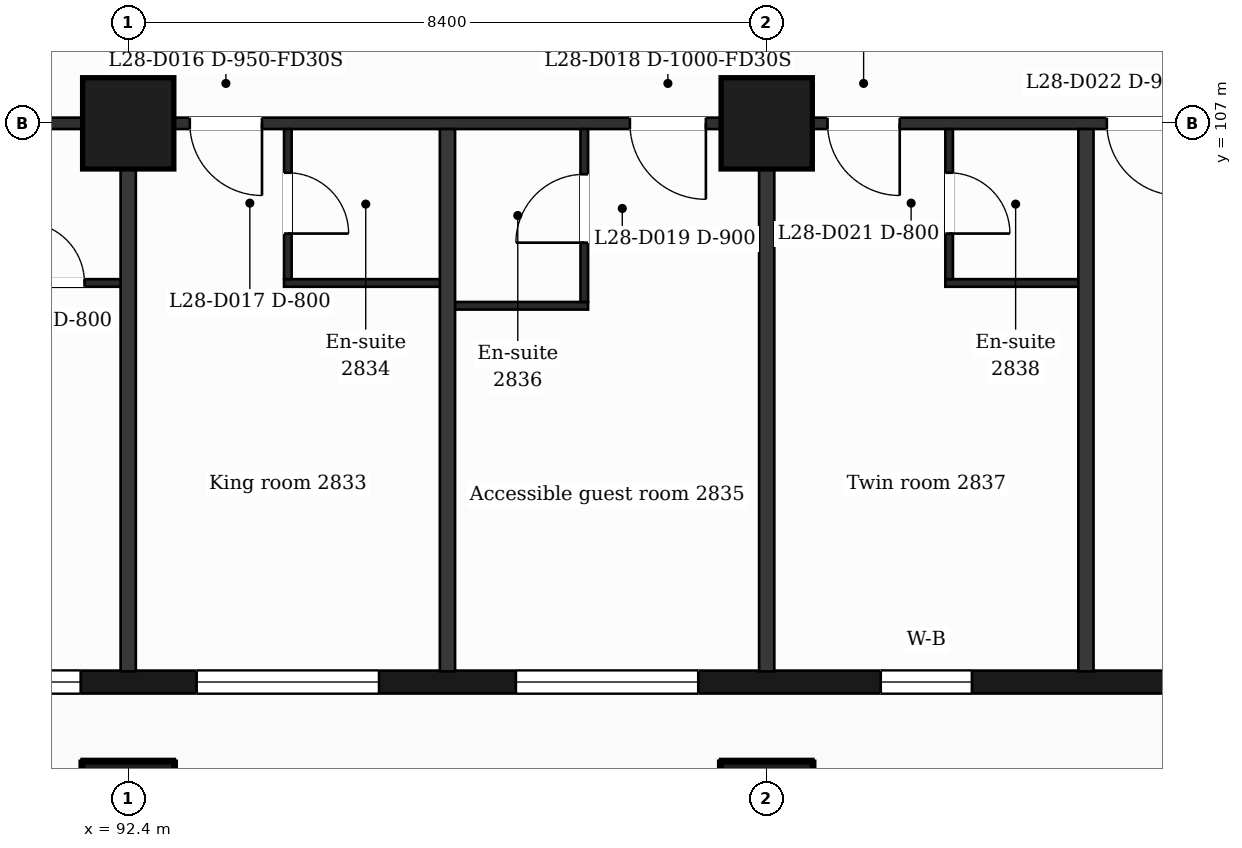
"""IFC4 building model, lengths in metres.
Left out: names, types, materials, properties, quantities, classifications, styles, units other than length and angle.
Written with IfcOpenShell. Run it as: python <this file> out.ifc"""

import sys

from ifc_helpers import new_model, si_unit, direction, frame, frame_2d, origin, origin_2d, place, context, subcontext, project, spatial, rectangle, extrude, element, fill, save


model = new_model("IFC4")
c1 = context("Model", 3, precision=1e-05, world=origin(), true_north=direction((0.0, 1.0)))
c2 = subcontext(c1, "Body", "Model", "MODEL_VIEW")
j1 = project(units=[si_unit("LENGTHUNIT", "METRE"), si_unit("PLANEANGLEUNIT", "RADIAN")], contexts=[c1])
p1 = place(None, origin())
s1 = spatial("IfcSite", under=j1, at=p1, CompositionType="ELEMENT")
p2 = place(p1, origin())
s2 = spatial("IfcBuilding", under=s1, at=p2, CompositionType="ELEMENT")
p3 = place(p2, frame((0.0, 0.0, 120.6)))
s3 = spatial("IfcBuildingStorey", under=s2, at=p3, CompositionType="ELEMENT", Elevation=120.6)
for number, where, z_axis, x_axis in (
    (1, (92.4, 98.0, 0.0), (0.0, 0.0, 1.0), (1.0, 0.0, 0.0)),
    (2, (100.8, 98.0, 0.0), (0.0, 0.0, 1.0), (1.0, 0.0, 0.0)),
    (3, (92.4, 107.0, 0.0), (0.0, 0.0, 1.0), (1.0, 0.0, 0.0)),
    (4, (100.8, 107.0, 0.0), (0.0, 0.0, 1.0), (1.0, 0.0, 0.0)),
):
    element("IfcColumn", number, at=place(p3, frame(where, z_axis=z_axis, x_axis=x_axis)), inside=s3, PredefinedType="COLUMN", context=c2, shape_type="SweptSolid", body=[
        extrude(rectangle(XDim=1.2, YDim=1.2, at=origin_2d()), origin(), (0.0, 0.0, 1.0), 3.7),
    ])
p4 = place(p3, frame((89.85, 99.65, 0.0), z_axis=(0.0, 0.0, 1.0), x_axis=(1.0, 0.0, 0.0)))
e5 = element("IfcWall", 5, at=p4, inside=s3, PredefinedType="SOLIDWALL", context=c2, shape_type="SweptSolid", body=[
    extrude(rectangle(XDim=47.25, YDim=0.3, at=frame_2d((23.625, 0.0))), origin(), (0.0, 0.0, 1.0), 3.38),
])
p5 = place(p4, frame((0.725, 0.0, 0.9)))
e6 = element("IfcOpeningElement", 6, at=p5, cuts=e5, PredefinedType="OPENING", context=c2, shape_type="SweptSolid", body=[
    extrude(rectangle(XDim=1.2, YDim=2.1, at=frame_2d((0.6, 1.05))), frame((0.0, 0.16, 0.0), z_axis=(0.0, -1.0, 0.0), x_axis=(1.0, 0.0, 0.0)), (0.0, 0.0, 1.0), 0.32),
])
p6 = place(p4, frame((3.45, 0.0, 0.9)))
e7 = element("IfcOpeningElement", 7, at=p6, cuts=e5, PredefinedType="OPENING", context=c2, shape_type="SweptSolid", body=[
    extrude(rectangle(XDim=2.4, YDim=2.1, at=frame_2d((1.2, 1.05))), frame((0.0, 0.16, 0.0), z_axis=(0.0, -1.0, 0.0), x_axis=(1.0, 0.0, 0.0)), (0.0, 0.0, 1.0), 0.32),
])
p7 = place(p4, frame((7.65, 0.0, 0.9)))
e8 = element("IfcOpeningElement", 8, at=p7, cuts=e5, PredefinedType="OPENING", context=c2, shape_type="SweptSolid", body=[
    extrude(rectangle(XDim=2.4, YDim=2.1, at=frame_2d((1.2, 1.05))), frame((0.0, 0.16, 0.0), z_axis=(0.0, -1.0, 0.0), x_axis=(1.0, 0.0, 0.0)), (0.0, 0.0, 1.0), 0.32),
])
p8 = place(p4, frame((12.45, 0.0, 0.9)))
e9 = element("IfcOpeningElement", 9, at=p8, cuts=e5, PredefinedType="OPENING", context=c2, shape_type="SweptSolid", body=[
    extrude(rectangle(XDim=1.2, YDim=2.1, at=frame_2d((0.6, 1.05))), frame((0.0, 0.16, 0.0), z_axis=(0.0, -1.0, 0.0), x_axis=(1.0, 0.0, 0.0)), (0.0, 0.0, 1.0), 0.32),
])
p9 = place(p4, frame((16.65, 0.0, 0.9)))
e10 = element("IfcOpeningElement", 10, at=p9, cuts=e5, PredefinedType="OPENING", context=c2, shape_type="SweptSolid", body=[
    extrude(rectangle(XDim=1.2, YDim=2.1, at=frame_2d((0.6, 1.05))), frame((0.0, 0.16, 0.0), z_axis=(0.0, -1.0, 0.0), x_axis=(1.0, 0.0, 0.0)), (0.0, 0.0, 1.0), 0.32),
])
p10 = place(p4, frame((19.95, 0.0, 0.0)))
e11 = element("IfcOpeningElement", 11, at=p10, cuts=e5, PredefinedType="OPENING", context=c2, shape_type="SweptSolid", body=[
    extrude(rectangle(XDim=1.2, YDim=2.4, at=frame_2d((0.6, 1.2))), frame((0.0, 0.16, 0.0), z_axis=(0.0, -1.0, 0.0), x_axis=(1.0, 0.0, 0.0)), (0.0, 0.0, 1.0), 0.32),
])
p11 = place(p4, frame((21.75, 0.0, 0.9)))
e12 = element("IfcOpeningElement", 12, at=p11, cuts=e5, PredefinedType="OPENING", context=c2, shape_type="SweptSolid", body=[
    extrude(rectangle(XDim=1.2, YDim=2.1, at=frame_2d((0.6, 1.05))), frame((0.0, 0.16, 0.0), z_axis=(0.0, -1.0, 0.0), x_axis=(1.0, 0.0, 0.0)), (0.0, 0.0, 1.0), 0.32),
])
p12 = place(p4, frame((24.45, 0.0, 0.9)))
e13 = element("IfcOpeningElement", 13, at=p12, cuts=e5, PredefinedType="OPENING", context=c2, shape_type="SweptSolid", body=[
    extrude(rectangle(XDim=2.4, YDim=2.1, at=frame_2d((1.2, 1.05))), frame((0.0, 0.16, 0.0), z_axis=(0.0, -1.0, 0.0), x_axis=(1.0, 0.0, 0.0)), (0.0, 0.0, 1.0), 0.32),
])
p13 = place(p4, frame((28.35, 0.0, 0.0)))
e14 = element("IfcOpeningElement", 14, at=p13, cuts=e5, PredefinedType="OPENING", context=c2, shape_type="SweptSolid", body=[
    extrude(rectangle(XDim=1.2, YDim=2.4, at=frame_2d((0.6, 1.2))), frame((0.0, 0.16, 0.0), z_axis=(0.0, -1.0, 0.0), x_axis=(1.0, 0.0, 0.0)), (0.0, 0.0, 1.0), 0.32),
])
p14 = place(p4, frame((30.15, 0.0, 0.9)))
e15 = element("IfcOpeningElement", 15, at=p14, cuts=e5, PredefinedType="OPENING", context=c2, shape_type="SweptSolid", body=[
    extrude(rectangle(XDim=1.2, YDim=2.1, at=frame_2d((0.6, 1.05))), frame((0.0, 0.16, 0.0), z_axis=(0.0, -1.0, 0.0), x_axis=(1.0, 0.0, 0.0)), (0.0, 0.0, 1.0), 0.32),
])
p15 = place(p4, frame((32.85, 0.0, 0.9)))
e16 = element("IfcOpeningElement", 16, at=p15, cuts=e5, PredefinedType="OPENING", context=c2, shape_type="SweptSolid", body=[
    extrude(rectangle(XDim=2.4, YDim=2.1, at=frame_2d((1.2, 1.05))), frame((0.0, 0.16, 0.0), z_axis=(0.0, -1.0, 0.0), x_axis=(1.0, 0.0, 0.0)), (0.0, 0.0, 1.0), 0.32),
])
p16 = place(p4, frame((37.05, 0.0, 0.9)))
e17 = element("IfcOpeningElement", 17, at=p16, cuts=e5, PredefinedType="OPENING", context=c2, shape_type="SweptSolid", body=[
    extrude(rectangle(XDim=2.4, YDim=2.1, at=frame_2d((1.2, 1.05))), frame((0.0, 0.16, 0.0), z_axis=(0.0, -1.0, 0.0), x_axis=(1.0, 0.0, 0.0)), (0.0, 0.0, 1.0), 0.32),
])
p17 = place(p4, frame((41.85, 0.0, 0.9)))
e18 = element("IfcOpeningElement", 18, at=p17, cuts=e5, PredefinedType="OPENING", context=c2, shape_type="SweptSolid", body=[
    extrude(rectangle(XDim=1.2, YDim=2.1, at=frame_2d((0.6, 1.05))), frame((0.0, 0.16, 0.0), z_axis=(0.0, -1.0, 0.0), x_axis=(1.0, 0.0, 0.0)), (0.0, 0.0, 1.0), 0.32),
])
p18 = place(p4, frame((45.25, 0.0, 0.9)))
e19 = element("IfcOpeningElement", 19, at=p18, cuts=e5, PredefinedType="OPENING", context=c2, shape_type="SweptSolid", body=[
    extrude(rectangle(XDim=1.2, YDim=2.1, at=frame_2d((0.6, 1.05))), frame((0.0, 0.16, 0.0), z_axis=(0.0, -1.0, 0.0), x_axis=(1.0, 0.0, 0.0)), (0.0, 0.0, 1.0), 0.32),
])
p19 = place(p3, frame((96.6, 104.6, 0.0), z_axis=(0.0, 0.0, 1.0), x_axis=(1.0, 0.0, 0.0)))
e20 = element("IfcWall", 20, at=p19, inside=s3, PredefinedType="PARTITIONING", context=c2, shape_type="SweptSolid", body=[
    extrude(rectangle(XDim=1.85, YDim=0.1, at=frame_2d((0.925, 0.0))), origin(), (0.0, 0.0, 1.0), 3.38),
])
p20 = place(p3, frame((89.95, 104.9, 0.0), z_axis=(0.0, 0.0, 1.0), x_axis=(1.0, 0.0, 0.0)))
e21 = element("IfcWall", 21, at=p20, inside=s3, PredefinedType="PARTITIONING", context=c2, shape_type="SweptSolid", body=[
    extrude(rectangle(XDim=2.45, YDim=0.1, at=frame_2d((1.225, 0.0))), origin(), (0.0, 0.0, 1.0), 3.38),
])
p21 = place(p20, frame((1.075, 0.0, 0.0)))
e22 = element("IfcOpeningElement", 22, at=p21, cuts=e21, PredefinedType="OPENING", context=c2, shape_type="SweptSolid", body=[
    extrude(rectangle(XDim=0.8, YDim=2.1, at=frame_2d((0.4, 1.05))), frame((0.0, 0.06, 0.0), z_axis=(0.0, -1.0, 0.0), x_axis=(1.0, 0.0, 0.0)), (0.0, 0.0, 1.0), 0.12),
])
p22 = place(p3, frame((94.45, 104.9, 0.0), z_axis=(0.0, 0.0, 1.0), x_axis=(1.0, 0.0, 0.0)))
e23 = element("IfcWall", 23, at=p22, inside=s3, PredefinedType="PARTITIONING", context=c2, shape_type="SweptSolid", body=[
    extrude(rectangle(XDim=2.15, YDim=0.1, at=frame_2d((1.075, 0.0))), origin(), (0.0, 0.0, 1.0), 3.38),
])
p23 = place(p3, frame((103.15, 104.9, 0.0), z_axis=(0.0, 0.0, 1.0), x_axis=(1.0, 0.0, 0.0)))
e24 = element("IfcWall", 24, at=p23, inside=s3, PredefinedType="PARTITIONING", context=c2, shape_type="SweptSolid", body=[
    extrude(rectangle(XDim=1.85, YDim=0.1, at=frame_2d((0.925, 0.0))), origin(), (0.0, 0.0, 1.0), 3.38),
])
p24 = place(p3, frame((87.018, 107.0, 0.0), z_axis=(0.0, 0.0, 1.0), x_axis=(1.0, 0.0, 0.0)))
e25 = element("IfcWall", 25, at=p24, inside=s3, PredefinedType="PARTITIONING", context=c2, shape_type="SweptSolid", body=[
    extrude(rectangle(XDim=52.765, YDim=0.15, at=frame_2d((26.382, 0.0))), origin(), (0.0, 0.0, 1.0), 3.38),
])
p25 = place(p24, frame((1.276, 0.0, 0.0)))
e26 = element("IfcOpeningElement", 26, at=p25, cuts=e25, PredefinedType="OPENING", context=c2, shape_type="SweptSolid", body=[
    extrude(rectangle(XDim=0.95, YDim=2.1, at=frame_2d((0.475, 1.05))), frame((0.0, 0.085, 0.0), z_axis=(0.0, -1.0, 0.0), x_axis=(1.0, 0.0, 0.0)), (0.0, 0.0, 1.0), 0.17),
])
p26 = place(p24, frame((6.192, 0.0, 0.0)))
e27 = element("IfcOpeningElement", 27, at=p26, cuts=e25, PredefinedType="OPENING", context=c2, shape_type="SweptSolid", body=[
    extrude(rectangle(XDim=0.95, YDim=2.1, at=frame_2d((0.475, 1.05))), frame((0.0, 0.085, 0.0), z_axis=(0.0, -1.0, 0.0), x_axis=(1.0, 0.0, 0.0)), (0.0, 0.0, 1.0), 0.17),
])
p27 = place(p24, frame((11.982, 0.0, 0.0)))
e28 = element("IfcOpeningElement", 28, at=p27, cuts=e25, PredefinedType="OPENING", context=c2, shape_type="SweptSolid", body=[
    extrude(rectangle(XDim=1.0, YDim=2.1, at=frame_2d((0.5, 1.05))), frame((0.0, 0.085, 0.0), z_axis=(0.0, -1.0, 0.0), x_axis=(1.0, 0.0, 0.0)), (0.0, 0.0, 1.0), 0.17),
])
p28 = place(p24, frame((14.582, 0.0, 0.0)))
e29 = element("IfcOpeningElement", 29, at=p28, cuts=e25, PredefinedType="OPENING", context=c2, shape_type="SweptSolid", body=[
    extrude(rectangle(XDim=0.95, YDim=2.1, at=frame_2d((0.475, 1.05))), frame((0.0, 0.085, 0.0), z_axis=(0.0, -1.0, 0.0), x_axis=(1.0, 0.0, 0.0)), (0.0, 0.0, 1.0), 0.17),
])
p29 = place(p24, frame((18.257, 0.0, 0.0)))
e30 = element("IfcOpeningElement", 30, at=p29, cuts=e25, PredefinedType="OPENING", context=c2, shape_type="SweptSolid", body=[
    extrude(rectangle(XDim=0.95, YDim=2.1, at=frame_2d((0.475, 1.05))), frame((0.0, 0.085, 0.0), z_axis=(0.0, -1.0, 0.0), x_axis=(1.0, 0.0, 0.0)), (0.0, 0.0, 1.0), 0.17),
])
p30 = place(p24, frame((22.992, 0.0, 0.0)))
e31 = element("IfcOpeningElement", 31, at=p30, cuts=e25, PredefinedType="OPENING", context=c2, shape_type="SweptSolid", body=[
    extrude(rectangle(XDim=0.95, YDim=2.1, at=frame_2d((0.475, 1.05))), frame((0.0, 0.085, 0.0), z_axis=(0.0, -1.0, 0.0), x_axis=(1.0, 0.0, 0.0)), (0.0, 0.0, 1.0), 0.17),
])
p31 = place(p24, frame((26.632, 0.0, 0.0)))
e32 = element("IfcOpeningElement", 32, at=p31, cuts=e25, PredefinedType="OPENING", context=c2, shape_type="SweptSolid", body=[
    extrude(rectangle(XDim=1.0, YDim=2.1, at=frame_2d((0.5, 1.05))), frame((0.0, 0.085, 0.0), z_axis=(0.0, -1.0, 0.0), x_axis=(1.0, 0.0, 0.0)), (0.0, 0.0, 1.0), 0.17),
])
p32 = place(p24, frame((33.557, 0.0, 0.0)))
e33 = element("IfcOpeningElement", 33, at=p32, cuts=e25, PredefinedType="OPENING", context=c2, shape_type="SweptSolid", body=[
    extrude(rectangle(XDim=0.95, YDim=2.1, at=frame_2d((0.475, 1.05))), frame((0.0, 0.085, 0.0), z_axis=(0.0, -1.0, 0.0), x_axis=(1.0, 0.0, 0.0)), (0.0, 0.0, 1.0), 0.17),
])
p33 = place(p24, frame((37.182, 0.0, 0.0)))
e34 = element("IfcOpeningElement", 34, at=p33, cuts=e25, PredefinedType="OPENING", context=c2, shape_type="SweptSolid", body=[
    extrude(rectangle(XDim=0.95, YDim=2.1, at=frame_2d((0.475, 1.05))), frame((0.0, 0.085, 0.0), z_axis=(0.0, -1.0, 0.0), x_axis=(1.0, 0.0, 0.0)), (0.0, 0.0, 1.0), 0.17),
])
p34 = place(p24, frame((41.957, 0.0, 0.0)))
e35 = element("IfcOpeningElement", 35, at=p34, cuts=e25, PredefinedType="OPENING", context=c2, shape_type="SweptSolid", body=[
    extrude(rectangle(XDim=0.95, YDim=2.1, at=frame_2d((0.475, 1.05))), frame((0.0, 0.085, 0.0), z_axis=(0.0, -1.0, 0.0), x_axis=(1.0, 0.0, 0.0)), (0.0, 0.0, 1.0), 0.17),
])
p35 = place(p24, frame((45.622, 0.0, 0.0)))
e36 = element("IfcOpeningElement", 36, at=p35, cuts=e25, PredefinedType="OPENING", context=c2, shape_type="SweptSolid", body=[
    extrude(rectangle(XDim=0.95, YDim=2.1, at=frame_2d((0.475, 1.05))), frame((0.0, 0.085, 0.0), z_axis=(0.0, -1.0, 0.0), x_axis=(1.0, 0.0, 0.0)), (0.0, 0.0, 1.0), 0.17),
])
p36 = place(p24, frame((48.56, 0.0, 0.0)))
e37 = element("IfcOpeningElement", 37, at=p36, cuts=e25, PredefinedType="OPENING", context=c2, shape_type="SweptSolid", body=[
    extrude(rectangle(XDim=0.95, YDim=2.1, at=frame_2d((0.475, 1.05))), frame((0.0, 0.085, 0.0), z_axis=(0.0, -1.0, 0.0), x_axis=(1.0, 0.0, 0.0)), (0.0, 0.0, 1.0), 0.17),
])
p37 = place(p3, frame((92.4, 99.79, 0.0), z_axis=(0.0, 0.0, 1.0), x_axis=(0.0, 1.0, 0.0)))
e38 = element("IfcWall", 38, at=p37, inside=s3, PredefinedType="PARTITIONING", context=c2, shape_type="SweptSolid", body=[
    extrude(rectangle(XDim=7.135, YDim=0.2, at=frame_2d((3.567, 0.0))), origin(), (0.0, 0.0, 1.0), 3.38),
])
p38 = place(p3, frame((94.5, 104.95, 0.0), z_axis=(0.0, 0.0, 1.0), x_axis=(0.0, 1.0, 0.0)))
e39 = element("IfcWall", 39, at=p38, inside=s3, PredefinedType="PARTITIONING", context=c2, shape_type="SweptSolid", body=[
    extrude(rectangle(XDim=1.975, YDim=0.1, at=frame_2d((0.988, 0.0))), origin(), (0.0, 0.0, 1.0), 3.38),
])
p39 = place(p38, frame((0.6, 0.0, 0.0)))
e40 = element("IfcOpeningElement", 40, at=p39, cuts=e39, PredefinedType="OPENING", context=c2, shape_type="SweptSolid", body=[
    extrude(rectangle(XDim=0.8, YDim=2.1, at=frame_2d((0.4, 1.05))), frame((0.0, 0.06, 0.0), z_axis=(0.0, -1.0, 0.0), x_axis=(1.0, 0.0, 0.0)), (0.0, 0.0, 1.0), 0.12),
])
p40 = place(p3, frame((96.6, 99.79, 0.0), z_axis=(0.0, 0.0, 1.0), x_axis=(0.0, 1.0, 0.0)))
e41 = element("IfcWall", 41, at=p40, inside=s3, PredefinedType="PARTITIONING", context=c2, shape_type="SweptSolid", body=[
    extrude(rectangle(XDim=7.135, YDim=0.2, at=frame_2d((3.567, 0.0))), origin(), (0.0, 0.0, 1.0), 3.38),
])
p41 = place(p3, frame((98.4, 104.65, 0.0), z_axis=(0.0, 0.0, 1.0), x_axis=(0.0, 1.0, 0.0)))
e42 = element("IfcWall", 42, at=p41, inside=s3, PredefinedType="PARTITIONING", context=c2, shape_type="SweptSolid", body=[
    extrude(rectangle(XDim=2.275, YDim=0.1, at=frame_2d((1.138, 0.0))), origin(), (0.0, 0.0, 1.0), 3.38),
])
p42 = place(p41, frame((0.78, 0.0, 0.0)))
e43 = element("IfcOpeningElement", 43, at=p42, cuts=e42, PredefinedType="OPENING", context=c2, shape_type="SweptSolid", body=[
    extrude(rectangle(XDim=0.9, YDim=2.1, at=frame_2d((0.45, 1.05))), frame((0.0, 0.06, 0.0), z_axis=(0.0, -1.0, 0.0), x_axis=(1.0, 0.0, 0.0)), (0.0, 0.0, 1.0), 0.12),
])
p43 = place(p3, frame((100.8, 99.79, 0.0), z_axis=(0.0, 0.0, 1.0), x_axis=(0.0, 1.0, 0.0)))
e44 = element("IfcWall", 44, at=p43, inside=s3, PredefinedType="PARTITIONING", context=c2, shape_type="SweptSolid", body=[
    extrude(rectangle(XDim=7.135, YDim=0.2, at=frame_2d((3.567, 0.0))), origin(), (0.0, 0.0, 1.0), 3.38),
])
p44 = place(p3, frame((103.2, 104.95, 0.0), z_axis=(0.0, 0.0, 1.0), x_axis=(0.0, 1.0, 0.0)))
e45 = element("IfcWall", 45, at=p44, inside=s3, PredefinedType="PARTITIONING", context=c2, shape_type="SweptSolid", body=[
    extrude(rectangle(XDim=1.975, YDim=0.1, at=frame_2d((0.988, 0.0))), origin(), (0.0, 0.0, 1.0), 3.38),
])
p45 = place(p44, frame((0.6, 0.0, 0.0)))
e46 = element("IfcOpeningElement", 46, at=p45, cuts=e45, PredefinedType="OPENING", context=c2, shape_type="SweptSolid", body=[
    extrude(rectangle(XDim=0.8, YDim=2.1, at=frame_2d((0.4, 1.05))), frame((0.0, 0.06, 0.0), z_axis=(0.0, -1.0, 0.0), x_axis=(1.0, 0.0, 0.0)), (0.0, 0.0, 1.0), 0.12),
])
p46 = place(p3, frame((105.0, 99.79, 0.0), z_axis=(0.0, 0.0, 1.0), x_axis=(0.0, 1.0, 0.0)))
e47 = element("IfcWall", 47, at=p46, inside=s3, PredefinedType="PARTITIONING", context=c2, shape_type="SweptSolid", body=[
    extrude(rectangle(XDim=7.135, YDim=0.2, at=frame_2d((3.567, 0.0))), origin(), (0.0, 0.0, 1.0), 3.38),
])
p47 = place(p5, origin())
e48 = element("IfcWindow", 48, at=p47, inside=s3, PartitioningType="SINGLE_PANEL", PredefinedType="WINDOW", context=c2, shape_type="SweptSolid", body=[
    extrude(rectangle(XDim=1.2, YDim=2.1, at=frame_2d((0.6, 1.05))), frame((0.0, 0.03, 0.0), z_axis=(0.0, -1.0, 0.0), x_axis=(1.0, 0.0, 0.0)), (0.0, 0.0, 1.0), 0.06),
])
fill(e6, e48)
p48 = place(p6, origin())
e49 = element("IfcWindow", 49, at=p48, inside=s3, PartitioningType="SINGLE_PANEL", PredefinedType="WINDOW", context=c2, shape_type="SweptSolid", body=[
    extrude(rectangle(XDim=2.4, YDim=2.1, at=frame_2d((1.2, 1.05))), frame((0.0, 0.03, 0.0), z_axis=(0.0, -1.0, 0.0), x_axis=(1.0, 0.0, 0.0)), (0.0, 0.0, 1.0), 0.06),
])
fill(e7, e49)
p49 = place(p7, origin())
e50 = element("IfcWindow", 50, at=p49, inside=s3, PartitioningType="SINGLE_PANEL", PredefinedType="WINDOW", context=c2, shape_type="SweptSolid", body=[
    extrude(rectangle(XDim=2.4, YDim=2.1, at=frame_2d((1.2, 1.05))), frame((0.0, 0.03, 0.0), z_axis=(0.0, -1.0, 0.0), x_axis=(1.0, 0.0, 0.0)), (0.0, 0.0, 1.0), 0.06),
])
fill(e8, e50)
p50 = place(p8, origin())
e51 = element("IfcWindow", 51, at=p50, inside=s3, PartitioningType="SINGLE_PANEL", PredefinedType="WINDOW", context=c2, shape_type="SweptSolid", body=[
    extrude(rectangle(XDim=1.2, YDim=2.1, at=frame_2d((0.6, 1.05))), frame((0.0, 0.03, 0.0), z_axis=(0.0, -1.0, 0.0), x_axis=(1.0, 0.0, 0.0)), (0.0, 0.0, 1.0), 0.06),
])
fill(e9, e51)
p51 = place(p21, origin())
e52 = element("IfcDoor", 52, at=p51, inside=s3, OperationType="SINGLE_SWING_LEFT", PredefinedType="DOOR", context=c2, shape_type="SweptSolid", body=[
    extrude(rectangle(XDim=0.8, YDim=2.1, at=frame_2d((0.4, 1.05))), frame((0.0, 0.025, 0.0), z_axis=(0.0, -1.0, 0.0), x_axis=(1.0, 0.0, 0.0)), (0.0, 0.0, 1.0), 0.05),
])
fill(e22, e52)
p52 = place(p26, origin())
e53 = element("IfcDoor", 53, at=p52, inside=s3, OperationType="SINGLE_SWING_RIGHT", PredefinedType="DOOR", context=c2, shape_type="SweptSolid", body=[
    extrude(rectangle(XDim=0.95, YDim=2.1, at=frame_2d((0.475, 1.05))), frame((0.0, 0.025, 0.0), z_axis=(0.0, -1.0, 0.0), x_axis=(1.0, 0.0, 0.0)), (0.0, 0.0, 1.0), 0.05),
])
fill(e27, e53)
p53 = place(p39, origin())
e54 = element("IfcDoor", 54, at=p53, inside=s3, OperationType="SINGLE_SWING_LEFT", PredefinedType="DOOR", context=c2, shape_type="SweptSolid", body=[
    extrude(rectangle(XDim=0.8, YDim=2.1, at=frame_2d((0.4, 1.05))), frame((0.0, 0.025, 0.0), z_axis=(0.0, -1.0, 0.0), x_axis=(1.0, 0.0, 0.0)), (0.0, 0.0, 1.0), 0.05),
])
fill(e40, e54)
p54 = place(p27, origin())
e55 = element("IfcDoor", 55, at=p54, inside=s3, OperationType="SINGLE_SWING_RIGHT", PredefinedType="DOOR", context=c2, shape_type="SweptSolid", body=[
    extrude(rectangle(XDim=1.0, YDim=2.1, at=frame_2d((0.5, 1.05))), frame((0.0, 0.025, 0.0), z_axis=(0.0, -1.0, 0.0), x_axis=(1.0, 0.0, 0.0)), (0.0, 0.0, 1.0), 0.05),
])
fill(e28, e55)
p55 = place(p42, origin())
e56 = element("IfcDoor", 56, at=p55, inside=s3, OperationType="SINGLE_SWING_LEFT", PredefinedType="DOOR", context=c2, shape_type="SweptSolid", body=[
    extrude(rectangle(XDim=0.9, YDim=2.1, at=frame_2d((0.45, 1.05))), frame((0.0, 0.025, 0.0), z_axis=(0.0, -1.0, 0.0), x_axis=(1.0, 0.0, 0.0)), (0.0, 0.0, 1.0), 0.05),
])
fill(e43, e56)
p56 = place(p28, origin())
e57 = element("IfcDoor", 57, at=p56, inside=s3, OperationType="SINGLE_SWING_RIGHT", PredefinedType="DOOR", context=c2, shape_type="SweptSolid", body=[
    extrude(rectangle(XDim=0.95, YDim=2.1, at=frame_2d((0.475, 1.05))), frame((0.0, 0.025, 0.0), z_axis=(0.0, -1.0, 0.0), x_axis=(1.0, 0.0, 0.0)), (0.0, 0.0, 1.0), 0.05),
])
fill(e29, e57)
p57 = place(p45, origin())
e58 = element("IfcDoor", 58, at=p57, inside=s3, OperationType="SINGLE_SWING_LEFT", PredefinedType="DOOR", context=c2, shape_type="SweptSolid", body=[
    extrude(rectangle(XDim=0.8, YDim=2.1, at=frame_2d((0.4, 1.05))), frame((0.0, 0.025, 0.0), z_axis=(0.0, -1.0, 0.0), x_axis=(1.0, 0.0, 0.0)), (0.0, 0.0, 1.0), 0.05),
])
fill(e46, e58)
p58 = place(p29, origin())
e59 = element("IfcDoor", 59, at=p58, inside=s3, OperationType="SINGLE_SWING_RIGHT", PredefinedType="DOOR", context=c2, shape_type="SweptSolid", body=[
    extrude(rectangle(XDim=0.95, YDim=2.1, at=frame_2d((0.475, 1.05))), frame((0.0, 0.025, 0.0), z_axis=(0.0, -1.0, 0.0), x_axis=(1.0, 0.0, 0.0)), (0.0, 0.0, 1.0), 0.05),
])
fill(e30, e59)
save(model, sys.argv[1])
